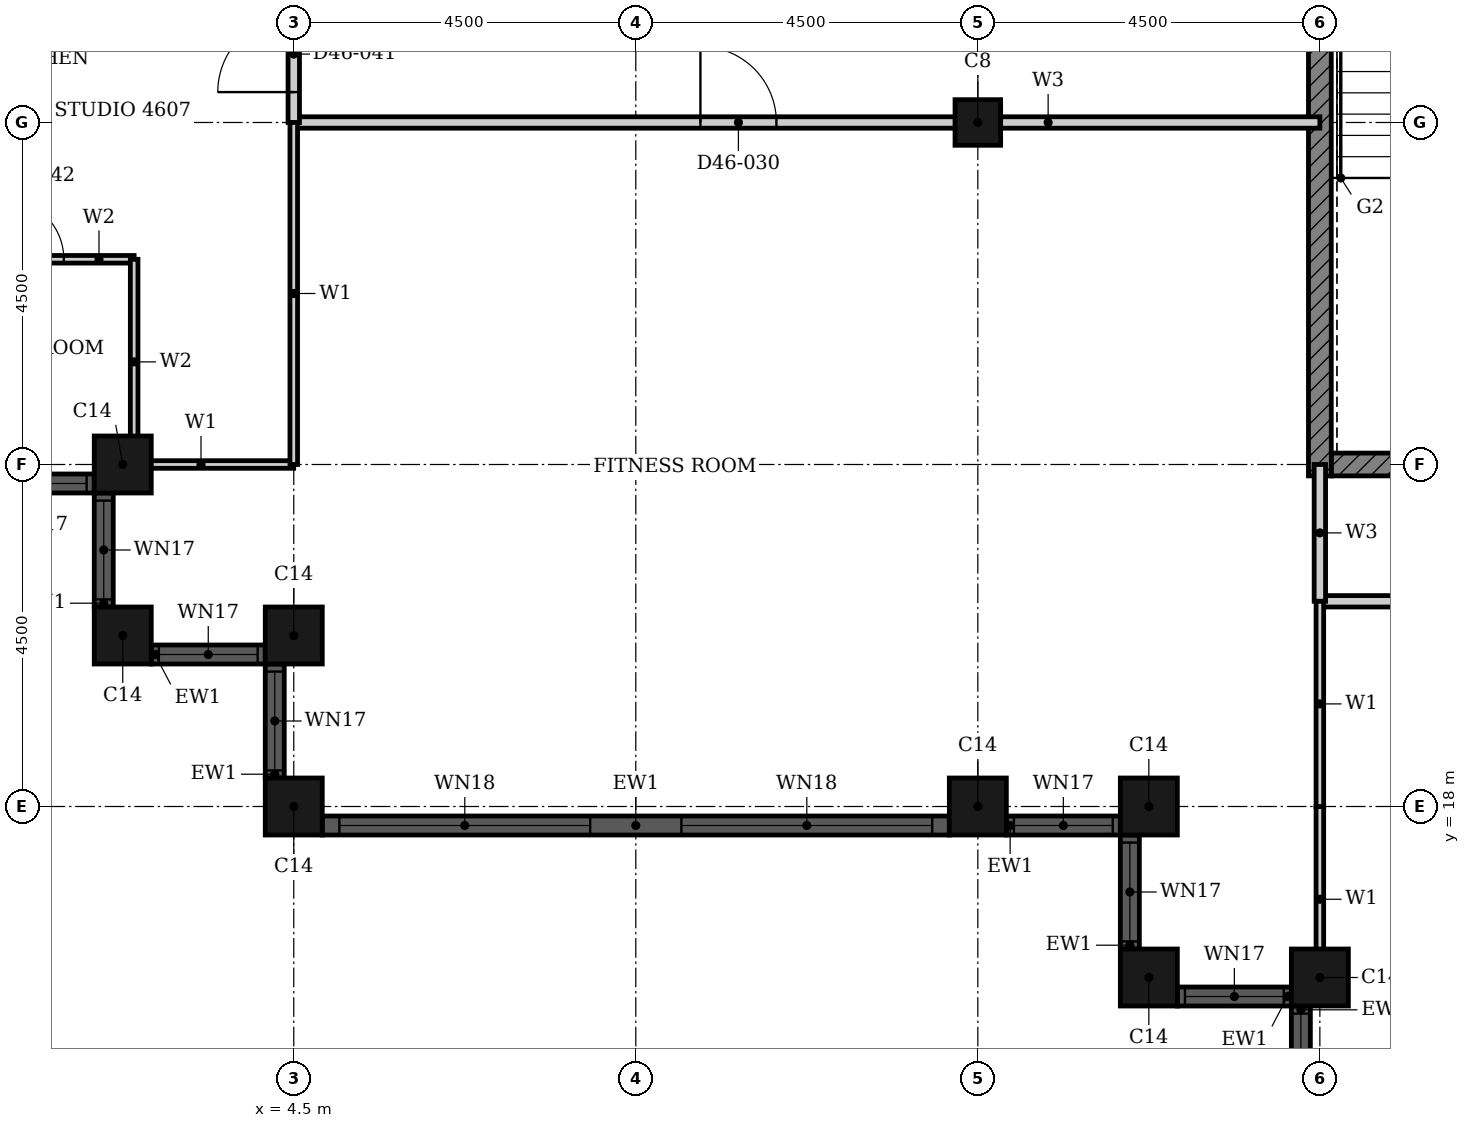
"""IFC4 building model, lengths in metres.
Left out: names, types, materials, properties, quantities, classifications, styles, units other than length and angle.
Written with IfcOpenShell. Run it as: python <this file> out.ifc"""

import sys

from ifc_helpers import new_model, si_unit, direction, frame, frame_2d, origin, origin_2d, place, context, subcontext, project, spatial, rectangle, hollow_rectangle, extrude, element, fill, save


model = new_model("IFC4")
c1 = context("Model", 3, precision=1e-05, world=origin(), true_north=direction((0.0, 1.0)))
c2 = subcontext(c1, "Body", "Model", "MODEL_VIEW")
j1 = project(units=[si_unit("LENGTHUNIT", "METRE"), si_unit("PLANEANGLEUNIT", "RADIAN")], contexts=[c1])
p1 = place(None, origin())
s1 = spatial("IfcSite", under=j1, at=p1, CompositionType="ELEMENT")
p2 = place(p1, origin())
s2 = spatial("IfcBuilding", under=s1, at=p2, CompositionType="ELEMENT")
p3 = place(p2, frame((0.0, 0.0, 183.9)))
s3 = spatial("IfcBuildingStorey", under=s2, at=p3, CompositionType="ELEMENT", Elevation=183.9)
for number, where, z_axis, x_axis in (
    (1, (2.25, 22.5, 0.0), (0.0, 0.0, 1.0), (1.0, 0.0, 0.0)),
    (2, (2.25, 20.25, 0.0), (0.0, 0.0, 1.0), (1.0, 0.0, 0.0)),
    (3, (4.5, 20.25, 0.0), (0.0, 0.0, 1.0), (1.0, 0.0, 0.0)),
    (4, (4.5, 18.0, 0.0), (0.0, 0.0, 1.0), (1.0, 0.0, 0.0)),
    (5, (13.5, 18.0, 0.0), (0.0, 0.0, 1.0), (1.0, 0.0, 0.0)),
    (6, (15.75, 18.0, 0.0), (0.0, 0.0, 1.0), (1.0, 0.0, 0.0)),
    (7, (15.75, 15.75, 0.0), (0.0, 0.0, 1.0), (1.0, 0.0, 0.0)),
    (8, (18.0, 15.75, 0.0), (0.0, 0.0, 1.0), (1.0, 0.0, 0.0)),
):
    element("IfcColumn", number, at=place(p3, frame(where, z_axis=z_axis, x_axis=x_axis)), inside=s3, PredefinedType="COLUMN", context=c2, shape_type="SweptSolid", body=[
        extrude(hollow_rectangle(XDim=0.75, YDim=0.75, WallThickness=0.024, at=origin_2d()), origin(), (0.0, 0.0, 1.0), 3.7),
    ])
p4 = place(p3, frame((13.5, 27.0, 0.0), z_axis=(0.0, 0.0, 1.0), x_axis=(1.0, 0.0, 0.0)))
e9 = element("IfcColumn", 9, at=p4, inside=s3, PredefinedType="COLUMN", context=c2, shape_type="SweptSolid", body=[
    extrude(hollow_rectangle(XDim=0.6, YDim=0.6, WallThickness=0.02, at=origin_2d()), origin(), (0.0, 0.0, 1.0), 3.7),
])
p5 = place(p3, frame((0.375, 22.25, 0.0), z_axis=(0.0, 0.0, 1.0), x_axis=(1.0, 0.0, 0.0)))
e10 = element("IfcWall", 10, at=p5, inside=s3, PredefinedType="SOLIDWALL", context=c2, shape_type="SweptSolid", body=[
    extrude(rectangle(XDim=1.5, YDim=0.25, at=frame_2d((0.75, 0.0))), origin(), (0.0, 0.0, 1.0), 3.7),
])
p6 = place(p5, frame((0.1, 0.0, 0.9)))
e11 = element("IfcOpeningElement", 11, at=p6, cuts=e10, PredefinedType="OPENING", context=c2, shape_type="SweptSolid", body=[
    extrude(rectangle(XDim=1.3, YDim=1.95, at=frame_2d((0.65, 0.975))), frame((0.0, 0.135, 0.0), z_axis=(0.0, -1.0, 0.0), x_axis=(1.0, 0.0, 0.0)), (0.0, 0.0, 1.0), 0.27),
])
p7 = place(p3, frame((2.0, 22.125, 0.0), z_axis=(0.0, 0.0, 1.0), x_axis=(0.0, -1.0, 0.0)))
e12 = element("IfcWall", 12, at=p7, inside=s3, PredefinedType="SOLIDWALL", context=c2, shape_type="SweptSolid", body=[
    extrude(rectangle(XDim=1.5, YDim=0.25, at=frame_2d((0.75, 0.0))), origin(), (0.0, 0.0, 1.0), 3.7),
])
p8 = place(p7, frame((0.1, 0.0, 0.9)))
e13 = element("IfcOpeningElement", 13, at=p8, cuts=e12, PredefinedType="OPENING", context=c2, shape_type="SweptSolid", body=[
    extrude(rectangle(XDim=1.3, YDim=1.95, at=frame_2d((0.65, 0.975))), frame((0.0, 0.135, 0.0), z_axis=(0.0, -1.0, 0.0), x_axis=(1.0, 0.0, 0.0)), (0.0, 0.0, 1.0), 0.27),
])
p9 = place(p3, frame((2.625, 20.0, 0.0), z_axis=(0.0, 0.0, 1.0), x_axis=(1.0, 0.0, 0.0)))
e14 = element("IfcWall", 14, at=p9, inside=s3, PredefinedType="SOLIDWALL", context=c2, shape_type="SweptSolid", body=[
    extrude(rectangle(XDim=1.5, YDim=0.25, at=frame_2d((0.75, 0.0))), origin(), (0.0, 0.0, 1.0), 3.7),
])
p10 = place(p9, frame((0.1, 0.0, 0.9)))
e15 = element("IfcOpeningElement", 15, at=p10, cuts=e14, PredefinedType="OPENING", context=c2, shape_type="SweptSolid", body=[
    extrude(rectangle(XDim=1.3, YDim=1.95, at=frame_2d((0.65, 0.975))), frame((0.0, 0.135, 0.0), z_axis=(0.0, -1.0, 0.0), x_axis=(1.0, 0.0, 0.0)), (0.0, 0.0, 1.0), 0.27),
])
p11 = place(p3, frame((4.25, 19.875, 0.0), z_axis=(0.0, 0.0, 1.0), x_axis=(0.0, -1.0, 0.0)))
e16 = element("IfcWall", 16, at=p11, inside=s3, PredefinedType="SOLIDWALL", context=c2, shape_type="SweptSolid", body=[
    extrude(rectangle(XDim=1.5, YDim=0.25, at=frame_2d((0.75, 0.0))), origin(), (0.0, 0.0, 1.0), 3.7),
])
p12 = place(p11, frame((0.1, 0.0, 0.9)))
e17 = element("IfcOpeningElement", 17, at=p12, cuts=e16, PredefinedType="OPENING", context=c2, shape_type="SweptSolid", body=[
    extrude(rectangle(XDim=1.3, YDim=1.95, at=frame_2d((0.65, 0.975))), frame((0.0, 0.135, 0.0), z_axis=(0.0, -1.0, 0.0), x_axis=(1.0, 0.0, 0.0)), (0.0, 0.0, 1.0), 0.27),
])
p13 = place(p3, frame((4.875, 17.75, 0.0), z_axis=(0.0, 0.0, 1.0), x_axis=(1.0, 0.0, 0.0)))
e18 = element("IfcWall", 18, at=p13, inside=s3, PredefinedType="SOLIDWALL", context=c2, shape_type="SweptSolid", body=[
    extrude(rectangle(XDim=8.25, YDim=0.25, at=frame_2d((4.125, 0.0))), origin(), (0.0, 0.0, 1.0), 3.7),
])
p14 = place(p13, frame((0.225, 0.0, 0.45)))
e19 = element("IfcOpeningElement", 19, at=p14, cuts=e18, PredefinedType="OPENING", context=c2, shape_type="SweptSolid", body=[
    extrude(rectangle(XDim=3.3, YDim=2.4, at=frame_2d((1.65, 1.2))), frame((0.0, 0.135, 0.0), z_axis=(0.0, -1.0, 0.0), x_axis=(1.0, 0.0, 0.0)), (0.0, 0.0, 1.0), 0.27),
])
p15 = place(p13, frame((4.725, 0.0, 0.45)))
e20 = element("IfcOpeningElement", 20, at=p15, cuts=e18, PredefinedType="OPENING", context=c2, shape_type="SweptSolid", body=[
    extrude(rectangle(XDim=3.3, YDim=2.4, at=frame_2d((1.65, 1.2))), frame((0.0, 0.135, 0.0), z_axis=(0.0, -1.0, 0.0), x_axis=(1.0, 0.0, 0.0)), (0.0, 0.0, 1.0), 0.27),
])
p16 = place(p3, frame((13.875, 17.75, 0.0), z_axis=(0.0, 0.0, 1.0), x_axis=(1.0, 0.0, 0.0)))
e21 = element("IfcWall", 21, at=p16, inside=s3, PredefinedType="SOLIDWALL", context=c2, shape_type="SweptSolid", body=[
    extrude(rectangle(XDim=1.5, YDim=0.25, at=frame_2d((0.75, 0.0))), origin(), (0.0, 0.0, 1.0), 3.7),
])
p17 = place(p16, frame((0.1, 0.0, 0.9)))
e22 = element("IfcOpeningElement", 22, at=p17, cuts=e21, PredefinedType="OPENING", context=c2, shape_type="SweptSolid", body=[
    extrude(rectangle(XDim=1.3, YDim=1.95, at=frame_2d((0.65, 0.975))), frame((0.0, 0.135, 0.0), z_axis=(0.0, -1.0, 0.0), x_axis=(1.0, 0.0, 0.0)), (0.0, 0.0, 1.0), 0.27),
])
p18 = place(p3, frame((15.5, 17.625, 0.0), z_axis=(0.0, 0.0, 1.0), x_axis=(0.0, -1.0, 0.0)))
e23 = element("IfcWall", 23, at=p18, inside=s3, PredefinedType="SOLIDWALL", context=c2, shape_type="SweptSolid", body=[
    extrude(rectangle(XDim=1.5, YDim=0.25, at=frame_2d((0.75, 0.0))), origin(), (0.0, 0.0, 1.0), 3.7),
])
p19 = place(p18, frame((0.1, 0.0, 0.9)))
e24 = element("IfcOpeningElement", 24, at=p19, cuts=e23, PredefinedType="OPENING", context=c2, shape_type="SweptSolid", body=[
    extrude(rectangle(XDim=1.3, YDim=1.95, at=frame_2d((0.65, 0.975))), frame((0.0, 0.135, 0.0), z_axis=(0.0, -1.0, 0.0), x_axis=(1.0, 0.0, 0.0)), (0.0, 0.0, 1.0), 0.27),
])
p20 = place(p3, frame((16.125, 15.5, 0.0), z_axis=(0.0, 0.0, 1.0), x_axis=(1.0, 0.0, 0.0)))
e25 = element("IfcWall", 25, at=p20, inside=s3, PredefinedType="SOLIDWALL", context=c2, shape_type="SweptSolid", body=[
    extrude(rectangle(XDim=1.5, YDim=0.25, at=frame_2d((0.75, 0.0))), origin(), (0.0, 0.0, 1.0), 3.7),
])
p21 = place(p20, frame((0.1, 0.0, 0.9)))
e26 = element("IfcOpeningElement", 26, at=p21, cuts=e25, PredefinedType="OPENING", context=c2, shape_type="SweptSolid", body=[
    extrude(rectangle(XDim=1.3, YDim=1.95, at=frame_2d((0.65, 0.975))), frame((0.0, 0.135, 0.0), z_axis=(0.0, -1.0, 0.0), x_axis=(1.0, 0.0, 0.0)), (0.0, 0.0, 1.0), 0.27),
])
p22 = place(p3, frame((17.75, 15.375, 0.0), z_axis=(0.0, 0.0, 1.0), x_axis=(0.0, -1.0, 0.0)))
e27 = element("IfcWall", 27, at=p22, inside=s3, PredefinedType="SOLIDWALL", context=c2, shape_type="SweptSolid", body=[
    extrude(rectangle(XDim=1.5, YDim=0.25, at=frame_2d((0.75, 0.0))), origin(), (0.0, 0.0, 1.0), 3.7),
])
p23 = place(p22, frame((0.1, 0.0, 0.9)))
e28 = element("IfcOpeningElement", 28, at=p23, cuts=e27, PredefinedType="OPENING", context=c2, shape_type="SweptSolid", body=[
    extrude(rectangle(XDim=1.3, YDim=1.95, at=frame_2d((0.65, 0.975))), frame((0.0, 0.135, 0.0), z_axis=(0.0, -1.0, 0.0), x_axis=(1.0, 0.0, 0.0)), (0.0, 0.0, 1.0), 0.27),
])
p24 = place(p3, frame((18.15, 22.5, 0.0), z_axis=(0.0, 0.0, 1.0), x_axis=(1.0, 0.0, 0.0)))
e29 = element("IfcWall", 29, at=p24, inside=s3, PredefinedType="SHEAR", context=c2, shape_type="SweptSolid", body=[
    extrude(rectangle(XDim=4.225, YDim=0.3, at=frame_2d((2.113, 0.0))), origin(), (0.0, 0.0, 1.0), 3.3),
])
p25 = place(p3, frame((18.0, 22.35, 0.0), z_axis=(0.0, 0.0, 1.0), x_axis=(0.0, 1.0, 0.0)))
e30 = element("IfcWall", 30, at=p25, inside=s3, PredefinedType="SHEAR", context=c2, shape_type="SweptSolid", body=[
    extrude(rectangle(XDim=9.3, YDim=0.3, at=frame_2d((4.65, 0.0))), origin(), (0.0, 0.0, 1.0), 3.3),
])
p26 = place(p3, frame((18.0, 20.7, 0.0), z_axis=(0.0, 0.0, 1.0), x_axis=(1.0, 0.0, 0.0)))
e31 = element("IfcWall", 31, at=p26, inside=s3, PredefinedType="PARTITIONING", context=c2, shape_type="SweptSolid", body=[
    extrude(rectangle(XDim=13.5, YDim=0.15, at=frame_2d((6.75, 0.0))), origin(), (0.0, 0.0, 1.0), 3.3),
])
p27 = place(p26, frame((6.25, 0.0, 0.0)))
e32 = element("IfcOpeningElement", 32, at=p27, cuts=e31, PredefinedType="OPENING", context=c2, shape_type="SweptSolid", body=[
    extrude(rectangle(XDim=1.0, YDim=2.1, at=frame_2d((0.5, 1.05))), frame((0.0, 0.085, 0.0), z_axis=(0.0, -1.0, 0.0), x_axis=(1.0, 0.0, 0.0)), (0.0, 0.0, 1.0), 0.17),
])
p28 = place(p3, frame((4.5, 27.0, 0.0), z_axis=(0.0, 0.0, 1.0), x_axis=(1.0, 0.0, 0.0)))
e33 = element("IfcWall", 33, at=p28, inside=s3, PredefinedType="PARTITIONING", context=c2, shape_type="SweptSolid", body=[
    extrude(rectangle(XDim=13.5, YDim=0.15, at=frame_2d((6.75, 0.0))), origin(), (0.0, 0.0, 1.0), 2.58),
])
p29 = place(p28, frame((5.35, 0.0, 0.0)))
e34 = element("IfcOpeningElement", 34, at=p29, cuts=e33, PredefinedType="OPENING", context=c2, shape_type="SweptSolid", body=[
    extrude(rectangle(XDim=1.0, YDim=2.1, at=frame_2d((0.5, 1.05))), frame((0.0, 0.085, 0.0), z_axis=(0.0, -1.0, 0.0), x_axis=(1.0, 0.0, 0.0)), (0.0, 0.0, 1.0), 0.17),
])
p30 = place(p3, frame((18.0, 20.7, 0.0), z_axis=(0.0, 0.0, 1.0), x_axis=(0.0, 1.0, 0.0)))
e35 = element("IfcWall", 35, at=p30, inside=s3, PredefinedType="PARTITIONING", context=c2, shape_type="SweptSolid", body=[
    extrude(rectangle(XDim=1.8, YDim=0.15, at=frame_2d((0.9, 0.0))), origin(), (0.0, 0.0, 1.0), 3.3),
])
p31 = place(p3, frame((4.5, 27.0, 0.0), z_axis=(0.0, 0.0, 1.0), x_axis=(0.0, 1.0, 0.0)))
e36 = element("IfcWall", 36, at=p31, inside=s3, PredefinedType="PARTITIONING", context=c2, shape_type="SweptSolid", body=[
    extrude(rectangle(XDim=1.8, YDim=0.15, at=frame_2d((0.9, 0.0))), origin(), (0.0, 0.0, 1.0), 3.3),
])
p32 = place(p31, frame((0.4, 0.0, 0.0)))
e37 = element("IfcOpeningElement", 37, at=p32, cuts=e36, PredefinedType="OPENING", context=c2, shape_type="SweptSolid", body=[
    extrude(rectangle(XDim=1.0, YDim=2.2, at=frame_2d((0.5, 1.1))), frame((0.0, 0.085, 0.0), z_axis=(0.0, -1.0, 0.0), x_axis=(1.0, 0.0, 0.0)), (0.0, 0.0, 1.0), 0.17),
])
p33 = place(p3, frame((2.06, 22.5, 0.0), z_axis=(0.0, 0.0, 1.0), x_axis=(1.0, 0.0, 0.0)))
e38 = element("IfcWall", 38, at=p33, inside=s3, PredefinedType="PARTITIONING", context=c2, shape_type="SweptSolid", body=[
    extrude(rectangle(XDim=2.439, YDim=0.1, at=frame_2d((1.219, 0.0))), origin(), (0.0, 0.0, 1.0), 2.58),
])
p34 = place(p3, frame((18.0, 15.56, 0.0), z_axis=(0.0, 0.0, 1.0), x_axis=(0.0, 1.0, 0.0)))
e39 = element("IfcWall", 39, at=p34, inside=s3, PredefinedType="PARTITIONING", context=c2, shape_type="SweptSolid", body=[
    extrude(rectangle(XDim=2.439, YDim=0.1, at=frame_2d((1.219, 0.0))), origin(), (0.0, 0.0, 1.0), 3.3),
])
p35 = place(p3, frame((18.0, 18.0, 0.0), z_axis=(0.0, 0.0, 1.0), x_axis=(0.0, 1.0, 0.0)))
e40 = element("IfcWall", 40, at=p35, inside=s3, PredefinedType="PARTITIONING", context=c2, shape_type="SweptSolid", body=[
    extrude(rectangle(XDim=2.7, YDim=0.1, at=frame_2d((1.35, 0.0))), origin(), (0.0, 0.0, 1.0), 3.3),
])
p36 = place(p3, frame((4.5, 22.5, 0.0), z_axis=(0.0, 0.0, 1.0), x_axis=(0.0, 1.0, 0.0)))
e41 = element("IfcWall", 41, at=p36, inside=s3, PredefinedType="PARTITIONING", context=c2, shape_type="SweptSolid", body=[
    extrude(rectangle(XDim=4.5, YDim=0.1, at=frame_2d((2.25, 0.0))), origin(), (0.0, 0.0, 1.0), 3.3),
])
p37 = place(p3, frame((-0.125, 25.2, 0.0), z_axis=(0.0, 0.0, 1.0), x_axis=(1.0, 0.0, 0.0)))
e42 = element("IfcWall", 42, at=p37, inside=s3, PredefinedType="PARTITIONING", context=c2, shape_type="SweptSolid", body=[
    extrude(rectangle(XDim=2.525, YDim=0.1, at=frame_2d((1.262, 0.0))), origin(), (0.0, 0.0, 1.0), 3.3),
])
p38 = place(p37, frame((0.8, 0.0, 0.0)))
e43 = element("IfcOpeningElement", 43, at=p38, cuts=e42, PredefinedType="OPENING", context=c2, shape_type="SweptSolid", body=[
    extrude(rectangle(XDim=0.8, YDim=2.1, at=frame_2d((0.4, 1.05))), frame((0.0, 0.06, 0.0), z_axis=(0.0, -1.0, 0.0), x_axis=(1.0, 0.0, 0.0)), (0.0, 0.0, 1.0), 0.12),
])
p39 = place(p3, frame((2.4, 22.5, 0.0), z_axis=(0.0, 0.0, 1.0), x_axis=(0.0, 1.0, 0.0)))
e44 = element("IfcWall", 44, at=p39, inside=s3, PredefinedType="PARTITIONING", context=c2, shape_type="SweptSolid", body=[
    extrude(rectangle(XDim=2.7, YDim=0.1, at=frame_2d((1.35, 0.0))), origin(), (0.0, 0.0, 1.0), 3.3),
])
p40 = place(p6, origin())
e45 = element("IfcWindow", 45, at=p40, inside=s3, PartitioningType="SINGLE_PANEL", PredefinedType="WINDOW", context=c2, shape_type="SweptSolid", body=[
    extrude(rectangle(XDim=1.3, YDim=1.95, at=frame_2d((0.65, 0.975))), frame((0.0, 0.03, 0.0), z_axis=(0.0, -1.0, 0.0), x_axis=(1.0, 0.0, 0.0)), (0.0, 0.0, 1.0), 0.06),
])
fill(e11, e45)
p41 = place(p8, origin())
e46 = element("IfcWindow", 46, at=p41, inside=s3, PartitioningType="SINGLE_PANEL", PredefinedType="WINDOW", context=c2, shape_type="SweptSolid", body=[
    extrude(rectangle(XDim=1.3, YDim=1.95, at=frame_2d((0.65, 0.975))), frame((0.0, 0.03, 0.0), z_axis=(0.0, -1.0, 0.0), x_axis=(1.0, 0.0, 0.0)), (0.0, 0.0, 1.0), 0.06),
])
fill(e13, e46)
p42 = place(p10, origin())
e47 = element("IfcWindow", 47, at=p42, inside=s3, PartitioningType="SINGLE_PANEL", PredefinedType="WINDOW", context=c2, shape_type="SweptSolid", body=[
    extrude(rectangle(XDim=1.3, YDim=1.95, at=frame_2d((0.65, 0.975))), frame((0.0, 0.03, 0.0), z_axis=(0.0, -1.0, 0.0), x_axis=(1.0, 0.0, 0.0)), (0.0, 0.0, 1.0), 0.06),
])
fill(e15, e47)
p43 = place(p12, origin())
e48 = element("IfcWindow", 48, at=p43, inside=s3, PartitioningType="SINGLE_PANEL", PredefinedType="WINDOW", context=c2, shape_type="SweptSolid", body=[
    extrude(rectangle(XDim=1.3, YDim=1.95, at=frame_2d((0.65, 0.975))), frame((0.0, 0.03, 0.0), z_axis=(0.0, -1.0, 0.0), x_axis=(1.0, 0.0, 0.0)), (0.0, 0.0, 1.0), 0.06),
])
fill(e17, e48)
p44 = place(p14, origin())
e49 = element("IfcWindow", 49, at=p44, inside=s3, PartitioningType="SINGLE_PANEL", PredefinedType="WINDOW", context=c2, shape_type="SweptSolid", body=[
    extrude(rectangle(XDim=3.3, YDim=2.4, at=frame_2d((1.65, 1.2))), frame((0.0, 0.03, 0.0), z_axis=(0.0, -1.0, 0.0), x_axis=(1.0, 0.0, 0.0)), (0.0, 0.0, 1.0), 0.06),
])
fill(e19, e49)
p45 = place(p15, origin())
e50 = element("IfcWindow", 50, at=p45, inside=s3, PartitioningType="SINGLE_PANEL", PredefinedType="WINDOW", context=c2, shape_type="SweptSolid", body=[
    extrude(rectangle(XDim=3.3, YDim=2.4, at=frame_2d((1.65, 1.2))), frame((0.0, 0.03, 0.0), z_axis=(0.0, -1.0, 0.0), x_axis=(1.0, 0.0, 0.0)), (0.0, 0.0, 1.0), 0.06),
])
fill(e20, e50)
p46 = place(p17, origin())
e51 = element("IfcWindow", 51, at=p46, inside=s3, PartitioningType="SINGLE_PANEL", PredefinedType="WINDOW", context=c2, shape_type="SweptSolid", body=[
    extrude(rectangle(XDim=1.3, YDim=1.95, at=frame_2d((0.65, 0.975))), frame((0.0, 0.03, 0.0), z_axis=(0.0, -1.0, 0.0), x_axis=(1.0, 0.0, 0.0)), (0.0, 0.0, 1.0), 0.06),
])
fill(e22, e51)
p47 = place(p19, origin())
e52 = element("IfcWindow", 52, at=p47, inside=s3, PartitioningType="SINGLE_PANEL", PredefinedType="WINDOW", context=c2, shape_type="SweptSolid", body=[
    extrude(rectangle(XDim=1.3, YDim=1.95, at=frame_2d((0.65, 0.975))), frame((0.0, 0.03, 0.0), z_axis=(0.0, -1.0, 0.0), x_axis=(1.0, 0.0, 0.0)), (0.0, 0.0, 1.0), 0.06),
])
fill(e24, e52)
p48 = place(p21, origin())
e53 = element("IfcWindow", 53, at=p48, inside=s3, PartitioningType="SINGLE_PANEL", PredefinedType="WINDOW", context=c2, shape_type="SweptSolid", body=[
    extrude(rectangle(XDim=1.3, YDim=1.95, at=frame_2d((0.65, 0.975))), frame((0.0, 0.03, 0.0), z_axis=(0.0, -1.0, 0.0), x_axis=(1.0, 0.0, 0.0)), (0.0, 0.0, 1.0), 0.06),
])
fill(e26, e53)
p49 = place(p23, origin())
e54 = element("IfcWindow", 54, at=p49, inside=s3, PartitioningType="SINGLE_PANEL", PredefinedType="WINDOW", context=c2, shape_type="SweptSolid", body=[
    extrude(rectangle(XDim=1.3, YDim=1.95, at=frame_2d((0.65, 0.975))), frame((0.0, 0.03, 0.0), z_axis=(0.0, -1.0, 0.0), x_axis=(1.0, 0.0, 0.0)), (0.0, 0.0, 1.0), 0.06),
])
fill(e28, e54)
p50 = place(p29, origin())
e55 = element("IfcDoor", 55, at=p50, inside=s3, OperationType="SINGLE_SWING_LEFT", PredefinedType="DOOR", context=c2, shape_type="SweptSolid", body=[
    extrude(rectangle(XDim=1.0, YDim=2.1, at=frame_2d((0.5, 1.05))), frame((0.0, 0.025, 0.0), z_axis=(0.0, -1.0, 0.0), x_axis=(1.0, 0.0, 0.0)), (0.0, 0.0, 1.0), 0.05),
])
fill(e34, e55)
p51 = place(p32, origin())
e56 = element("IfcDoor", 56, at=p51, inside=s3, OperationType="SINGLE_SWING_RIGHT", PredefinedType="DOOR", context=c2, shape_type="SweptSolid", body=[
    extrude(rectangle(XDim=1.0, YDim=2.2, at=frame_2d((0.5, 1.1))), frame((0.0, 0.025, 0.0), z_axis=(0.0, -1.0, 0.0), x_axis=(1.0, 0.0, 0.0)), (0.0, 0.0, 1.0), 0.05),
])
fill(e37, e56)
p52 = place(p38, origin())
e57 = element("IfcDoor", 57, at=p52, inside=s3, OperationType="SINGLE_SWING_RIGHT", PredefinedType="DOOR", context=c2, shape_type="SweptSolid", body=[
    extrude(rectangle(XDim=0.8, YDim=2.1, at=frame_2d((0.4, 1.05))), frame((0.0, 0.025, 0.0), z_axis=(0.0, -1.0, 0.0), x_axis=(1.0, 0.0, 0.0)), (0.0, 0.0, 1.0), 0.05),
])
fill(e43, e57)
save(model, sys.argv[1])
